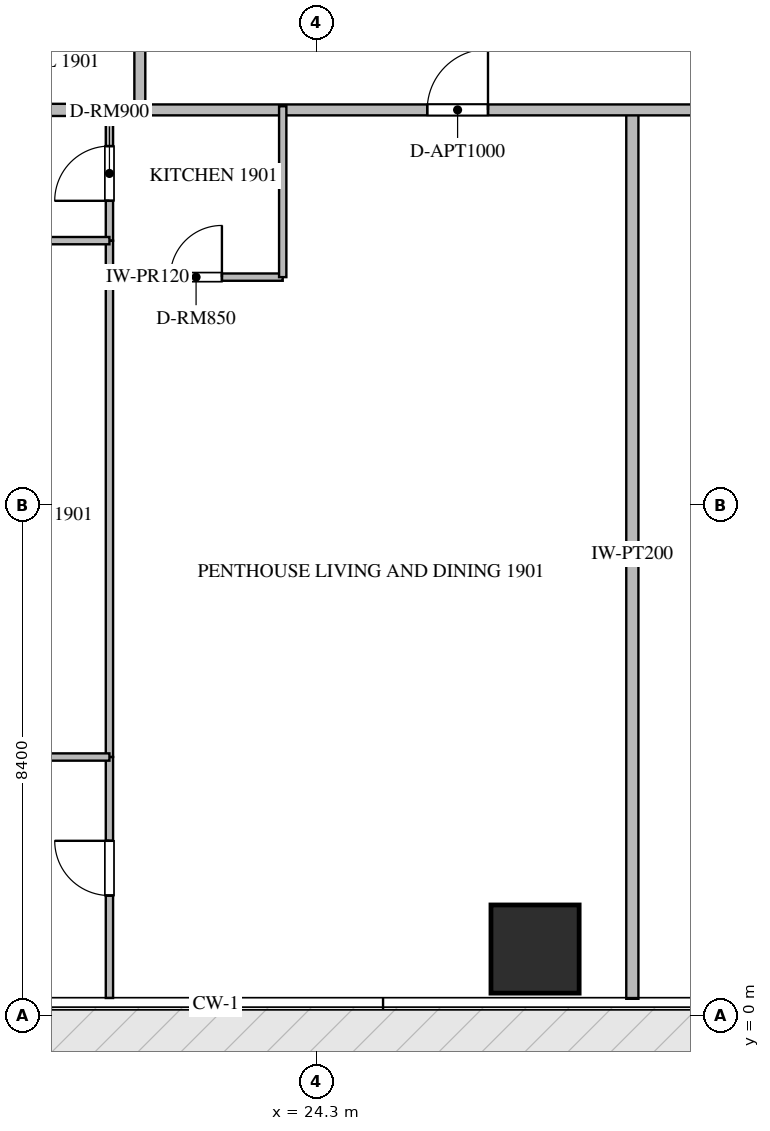
"""IFC4 building model, lengths in metres.
Left out: names, types, materials, properties, quantities, classifications, styles, units other than length and angle.
Written with IfcOpenShell. Run it as: python <this file> out.ifc"""

import sys

from ifc_helpers import new_model, si_unit, direction, frame, frame_2d, origin, origin_2d, place, context, subcontext, project, spatial, rectangle, extrude, source, transform, mapped, element, fill, save


model = new_model("IFC4")
c1 = context("Model", 3, precision=1e-05, world=origin(), true_north=direction((0.0, 1.0)))
c2 = subcontext(c1, "Body", "Model", "MODEL_VIEW")
j1 = project(units=[si_unit("LENGTHUNIT", "METRE"), si_unit("PLANEANGLEUNIT", "RADIAN")], contexts=[c1])
p1 = place(None, origin())
s1 = spatial("IfcSite", under=j1, at=p1, CompositionType="ELEMENT")
p2 = place(p1, origin())
s2 = spatial("IfcBuilding", under=s1, at=p2, CompositionType="ELEMENT")
p3 = place(p2, frame((0.0, 0.0, 79.2)))
s3 = spatial("IfcBuildingStorey", under=s2, at=p3, CompositionType="ELEMENT", Elevation=79.2)
m1 = source(origin(), c2, "Body", "SweptSolid", [
    extrude(rectangle(XDim=1.45, YDim=1.45, at=origin_2d()), origin(), (0.0, 0.0, 1.0), 3.75),
])
p4 = place(p3, frame((27.9, 1.1, -0.26), z_axis=(0.0, 0.0, 1.0), x_axis=(1.0, 0.0, 0.0)))
e1 = element("IfcColumn", 1, at=p4, inside=s3, PredefinedType="COLUMN", context=c2, shape_type="MappedRepresentation", body=[
    mapped(m1, transform((0.0, 0.0, 0.0), scale=1.0)),
])
p5 = place(p3, frame((29.5, 0.282, 0.0), z_axis=(0.0, 0.0, 1.0), x_axis=(0.0, 1.0, 0.0)))
e2 = element("IfcWall", 2, at=p5, inside=s3, PredefinedType="PARTITIONING", context=c2, shape_type="SweptSolid", body=[
    extrude(rectangle(XDim=14.618, YDim=0.2, at=frame_2d((7.309, 0.0))), origin(), (0.0, 0.0, 1.0), 3.49),
])
p6 = place(p3, frame((6.082, 14.9, 0.0), z_axis=(0.0, 0.0, 1.0), x_axis=(1.0, 0.0, 0.0)))
e3 = element("IfcWall", 3, at=p6, inside=s3, PredefinedType="PARTITIONING", context=c2, shape_type="SweptSolid", body=[
    extrude(rectangle(XDim=15.318, YDim=0.2, at=frame_2d((7.659, 0.0))), origin(), (0.0, 0.0, 1.0), 3.49),
])
p7 = place(p3, frame((21.402, 14.9, 0.0), z_axis=(0.0, 0.0, 1.0), x_axis=(1.0, 0.0, 0.0)))
e4 = element("IfcWall", 4, at=p7, inside=s3, PredefinedType="PARTITIONING", context=c2, shape_type="SweptSolid", body=[
    extrude(rectangle(XDim=21.996, YDim=0.18, at=frame_2d((10.998, 0.0))), origin(), (0.0, 0.0, 1.0), 3.49),
])
p8 = place(p7, frame((4.724, 0.0, 0.0)))
e5 = element("IfcOpeningElement", 5, at=p8, cuts=e4, PredefinedType="OPENING", context=c2, shape_type="SweptSolid", body=[
    extrude(rectangle(XDim=1.0, YDim=2.15, at=frame_2d((0.5, 1.075))), frame((0.0, 0.1, 0.0), z_axis=(0.0, -1.0, 0.0), x_axis=(1.0, 0.0, 0.0)), (0.0, 0.0, 1.0), 0.2),
])
p9 = place(p7, frame((10.498, 0.0, 0.0)))
e6 = element("IfcOpeningElement", 6, at=p9, cuts=e4, PredefinedType="OPENING", context=c2, shape_type="SweptSolid", body=[
    extrude(rectangle(XDim=1.0, YDim=2.15, at=frame_2d((0.5, 1.075))), frame((0.0, 0.1, 0.0), z_axis=(0.0, -1.0, 0.0), x_axis=(1.0, 0.0, 0.0)), (0.0, 0.0, 1.0), 0.2),
])
p10 = place(p3, frame((21.4, 14.9, 0.0), z_axis=(0.0, 0.0, 1.0), x_axis=(0.0, 1.0, 0.0)))
e7 = element("IfcWall", 7, at=p10, inside=s3, PredefinedType="PARTITIONING", context=c2, shape_type="SweptSolid", body=[
    extrude(rectangle(XDim=20.6, YDim=0.18, at=frame_2d((10.3, 0.0))), origin(), (0.0, 0.0, 1.0), 3.49),
])
p11 = place(p10, frame((3.469, 0.0, 0.0)))
e8 = element("IfcOpeningElement", 8, at=p11, cuts=e7, PredefinedType="OPENING", context=c2, shape_type="SweptSolid", body=[
    extrude(rectangle(XDim=1.0, YDim=2.15, at=frame_2d((0.5, 1.075))), frame((0.0, 0.1, 0.0), z_axis=(0.0, -1.0, 0.0), x_axis=(1.0, 0.0, 0.0)), (0.0, 0.0, 1.0), 0.2),
])
p12 = place(p10, frame((11.172, 0.0, 0.0)))
e9 = element("IfcOpeningElement", 9, at=p12, cuts=e7, PredefinedType="OPENING", context=c2, shape_type="SweptSolid", body=[
    extrude(rectangle(XDim=1.0, YDim=2.15, at=frame_2d((0.5, 1.075))), frame((0.0, 0.1, 0.0), z_axis=(0.0, -1.0, 0.0), x_axis=(1.0, 0.0, 0.0)), (0.0, 0.0, 1.0), 0.2),
])
p13 = place(p10, frame((17.92, 0.0, 0.0)))
e10 = element("IfcOpeningElement", 10, at=p13, cuts=e7, PredefinedType="OPENING", context=c2, shape_type="SweptSolid", body=[
    extrude(rectangle(XDim=1.0, YDim=2.15, at=frame_2d((0.5, 1.075))), frame((0.0, 0.1, 0.0), z_axis=(0.0, -1.0, 0.0), x_axis=(1.0, 0.0, 0.0)), (0.0, 0.0, 1.0), 0.2),
])
p14 = place(p3, frame((20.9, 12.15, 0.0), z_axis=(0.0, 0.0, 1.0), x_axis=(1.0, 0.0, 0.0)))
e11 = element("IfcWall", 11, at=p14, inside=s3, PredefinedType="PARTITIONING", context=c2, shape_type="SweptSolid", body=[
    extrude(rectangle(XDim=2.85, YDim=0.12, at=frame_2d((1.425, 0.0))), origin(), (0.0, 0.0, 1.0), 3.49),
])
p15 = place(p14, frame((1.0, 0.0, 0.0)))
e12 = element("IfcOpeningElement", 12, at=p15, cuts=e11, PredefinedType="OPENING", context=c2, shape_type="SweptSolid", body=[
    extrude(rectangle(XDim=0.85, YDim=2.1, at=frame_2d((0.425, 1.05))), frame((0.0, 0.07, 0.0), z_axis=(0.0, -1.0, 0.0), x_axis=(1.0, 0.0, 0.0)), (0.0, 0.0, 1.0), 0.14),
])
p16 = place(p3, frame((23.75, 12.15, 0.0), z_axis=(0.0, 0.0, 1.0), x_axis=(0.0, 1.0, 0.0)))
e13 = element("IfcWall", 13, at=p16, inside=s3, PredefinedType="PARTITIONING", context=c2, shape_type="SweptSolid", body=[
    extrude(rectangle(XDim=2.81, YDim=0.12, at=frame_2d((1.405, 0.0))), origin(), (0.0, 0.0, 1.0), 3.49),
])
p17 = place(p3, frame((20.9, 12.75, 0.0), z_axis=(0.0, 0.0, 1.0), x_axis=(0.0, 1.0, 0.0)))
e14 = element("IfcWall", 14, at=p17, inside=s3, PredefinedType="PARTITIONING", context=c2, shape_type="SweptSolid", body=[
    extrude(rectangle(XDim=2.21, YDim=0.12, at=frame_2d((1.105, 0.0))), origin(), (0.0, 0.0, 1.0), 3.49),
])
p18 = place(p17, frame((0.655, 0.0, 0.0)))
e15 = element("IfcOpeningElement", 15, at=p18, cuts=e14, PredefinedType="OPENING", context=c2, shape_type="SweptSolid", body=[
    extrude(rectangle(XDim=0.9, YDim=2.1, at=frame_2d((0.45, 1.05))), frame((0.0, 0.07, 0.0), z_axis=(0.0, -1.0, 0.0), x_axis=(1.0, 0.0, 0.0)), (0.0, 0.0, 1.0), 0.14),
])
p19 = place(p3, frame((20.9, 0.295, 0.0), z_axis=(0.0, 0.0, 1.0), x_axis=(0.0, 1.0, 0.0)))
e16 = element("IfcWall", 16, at=p19, inside=s3, PredefinedType="PARTITIONING", context=c2, shape_type="SweptSolid", body=[
    extrude(rectangle(XDim=3.963, YDim=0.12, at=frame_2d((1.981, 0.0))), origin(), (0.0, 0.0, 1.0), 3.49),
])
p20 = place(p19, frame((1.685, 0.0, 0.0)))
e17 = element("IfcOpeningElement", 17, at=p20, cuts=e16, PredefinedType="OPENING", context=c2, shape_type="SweptSolid", body=[
    extrude(rectangle(XDim=0.9, YDim=2.1, at=frame_2d((0.45, 1.05))), frame((0.0, 0.07, 0.0), z_axis=(0.0, -1.0, 0.0), x_axis=(1.0, 0.0, 0.0)), (0.0, 0.0, 1.0), 0.14),
])
p21 = place(p3, frame((20.9, 4.26, 0.0), z_axis=(0.0, 0.0, 1.0), x_axis=(0.0, 1.0, 0.0)))
e18 = element("IfcWall", 18, at=p21, inside=s3, PredefinedType="PARTITIONING", context=c2, shape_type="SweptSolid", body=[
    extrude(rectangle(XDim=8.488, YDim=0.12, at=frame_2d((4.244, 0.0))), origin(), (0.0, 0.0, 1.0), 3.49),
])
p22 = place(p3, frame((15.75, 4.258, 0.0), z_axis=(0.0, 0.0, 1.0), x_axis=(1.0, 0.0, 0.0)))
e19 = element("IfcWall", 19, at=p22, inside=s3, PredefinedType="PARTITIONING", context=c2, shape_type="SweptSolid", body=[
    extrude(rectangle(XDim=5.15, YDim=0.12, at=frame_2d((2.575, 0.0))), origin(), (0.0, 0.0, 1.0), 3.49),
])
p23 = place(p3, frame((17.852, 12.75, 0.0), z_axis=(0.0, 0.0, 1.0), x_axis=(1.0, 0.0, 0.0)))
e20 = element("IfcWall", 20, at=p23, inside=s3, PredefinedType="PARTITIONING", context=c2, shape_type="SweptSolid", body=[
    extrude(rectangle(XDim=3.048, YDim=0.12, at=frame_2d((1.524, 0.0))), origin(), (0.0, 0.0, 1.0), 3.49),
])
p24 = place(p23, frame((1.099, 0.0, 0.0)))
e21 = element("IfcOpeningElement", 21, at=p24, cuts=e20, PredefinedType="OPENING", context=c2, shape_type="SweptSolid", body=[
    extrude(rectangle(XDim=0.85, YDim=2.1, at=frame_2d((0.425, 1.05))), frame((0.0, 0.07, 0.0), z_axis=(0.0, -1.0, 0.0), x_axis=(1.0, 0.0, 0.0)), (0.0, 0.0, 1.0), 0.14),
])
m2 = source(origin(), c2, "Body", "SweptSolid", [
    extrude(rectangle(XDim=1.0, YDim=2.15, at=frame_2d((0.5, 1.075))), frame((0.0, 0.025, 0.0), z_axis=(0.0, -1.0, 0.0), x_axis=(1.0, 0.0, 0.0)), (0.0, 0.0, 1.0), 0.05),
])
p25 = place(p8, origin())
e22 = element("IfcDoor", 22, at=p25, inside=s3, OperationType="SINGLE_SWING_RIGHT", PredefinedType="DOOR", context=c2, shape_type="MappedRepresentation", body=[
    mapped(m2, transform((0.0, 0.0, 0.0), scale=1.0)),
])
fill(e5, e22)
m3 = source(origin(), c2, "Body", "SweptSolid", [
    extrude(rectangle(XDim=0.85, YDim=2.1, at=frame_2d((0.425, 1.05))), frame((0.0, 0.025, 0.0), z_axis=(0.0, -1.0, 0.0), x_axis=(1.0, 0.0, 0.0)), (0.0, 0.0, 1.0), 0.05),
])
p26 = place(p15, origin())
e23 = element("IfcDoor", 23, at=p26, inside=s3, OperationType="SINGLE_SWING_RIGHT", PredefinedType="DOOR", context=c2, shape_type="MappedRepresentation", body=[
    mapped(m3, transform((0.0, 0.0, 0.0), scale=1.0)),
])
fill(e12, e23)
m4 = source(origin(), c2, "Body", "SweptSolid", [
    extrude(rectangle(XDim=0.9, YDim=2.1, at=frame_2d((0.45, 1.05))), frame((0.0, 0.025, 0.0), z_axis=(0.0, -1.0, 0.0), x_axis=(1.0, 0.0, 0.0)), (0.0, 0.0, 1.0), 0.05),
])
p27 = place(p18, origin())
e24 = element("IfcDoor", 24, at=p27, inside=s3, OperationType="SINGLE_SWING_LEFT", PredefinedType="DOOR", context=c2, shape_type="MappedRepresentation", body=[
    mapped(m4, transform((0.0, 0.0, 0.0), scale=1.0)),
])
fill(e15, e24)
p28 = place(p20, origin())
e25 = element("IfcDoor", 25, at=p28, inside=s3, OperationType="SINGLE_SWING_RIGHT", PredefinedType="DOOR", context=c2, shape_type="MappedRepresentation", body=[
    mapped(m4, transform((0.0, 0.0, 0.0), scale=1.0)),
])
fill(e17, e25)
save(model, sys.argv[1])
